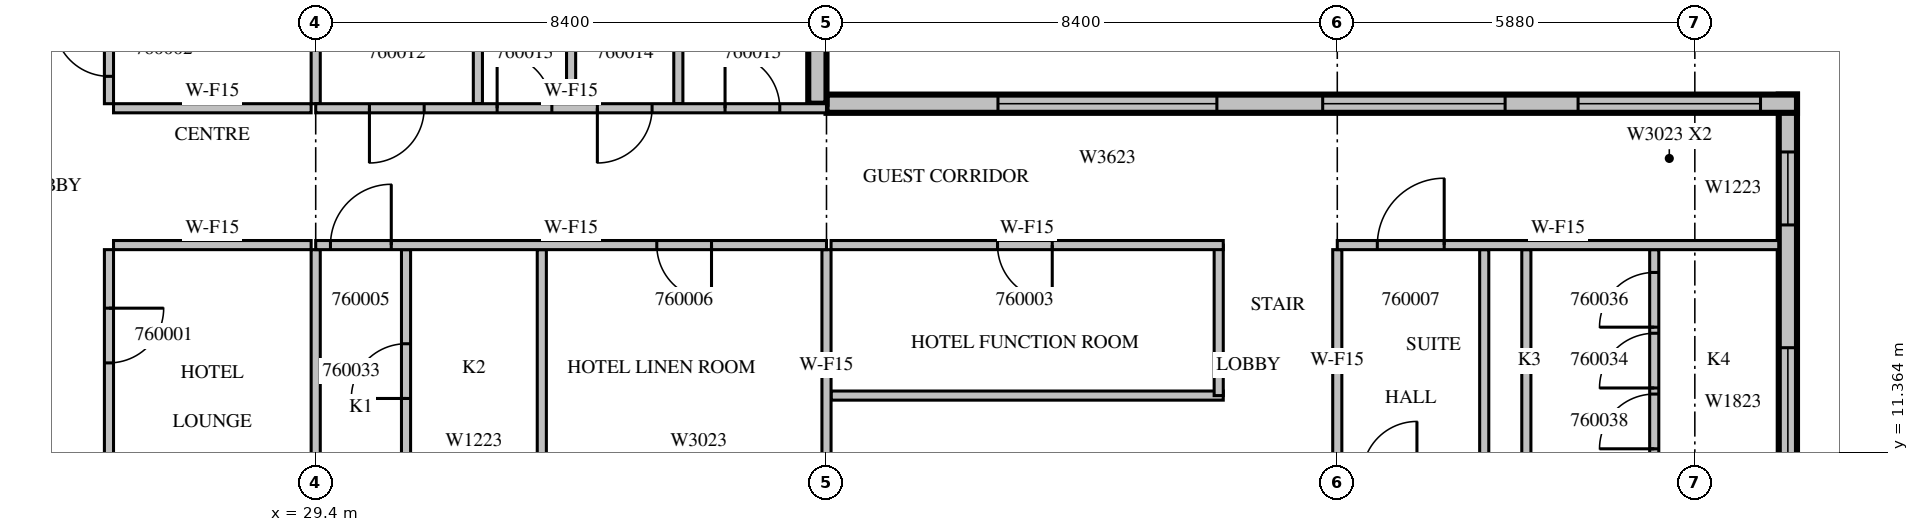
"""IFC4 building model, lengths in metres.
Left out: names, types, materials, properties, quantities, classifications, styles, units other than length and angle.
Written with IfcOpenShell. Run it as: python <this file> out.ifc"""

import sys

from ifc_helpers import new_model, si_unit, direction, frame, frame_2d, origin, place, context, subcontext, project, spatial, rectangle, extrude, source, transform, mapped, element, fill, save


model = new_model("IFC4")
c1 = context("Model", 3, precision=1e-05, world=origin(), true_north=direction((0.0, 1.0)))
c2 = subcontext(c1, "Body", "Model", "MODEL_VIEW")
j1 = project(units=[si_unit("LENGTHUNIT", "METRE"), si_unit("PLANEANGLEUNIT", "RADIAN")], contexts=[c1])
p1 = place(None, origin())
s1 = spatial("IfcSite", under=j1, at=p1, CompositionType="ELEMENT")
p2 = place(p1, origin())
s2 = spatial("IfcBuilding", under=s1, at=p2, CompositionType="ELEMENT")
p3 = place(p2, frame((0.0, 0.0, 261.4)))
s3 = spatial("IfcBuildingStorey", under=s2, at=p3, CompositionType="ELEMENT", Elevation=261.4)
m1 = source(origin(), c2, "Body", "SweptSolid", [
    extrude(rectangle(XDim=6.75, YDim=0.3, at=frame_2d((3.375, 0.0))), origin(), (0.0, 0.0, 1.0), 3.4),
])
p4 = place(p3, frame((53.61, 10.5, 0.0), z_axis=(0.0, 0.0, 1.0), x_axis=(0.0, 1.0, 0.0)))
e1 = element("IfcWall", 1, at=p4, inside=s3, PredefinedType="STANDARD", context=c2, shape_type="MappedRepresentation", body=[
    mapped(m1, transform((0.0, 0.0, 0.0), scale=1.0)),
])
m2 = source(origin(), c2, "Body", "SweptSolid", [
    extrude(rectangle(XDim=1.8, YDim=2.3, at=frame_2d((0.9, 1.15))), frame((0.0, 0.16, 0.0), z_axis=(0.0, -1.0, 0.0), x_axis=(1.0, 0.0, 0.0)), (0.0, 0.0, 1.0), 0.32),
])
p5 = place(p4, frame((0.787, 0.0, 0.6)))
e2 = element("IfcOpeningElement", 2, at=p5, cuts=e1, PredefinedType="OPENING", context=c2, shape_type="MappedRepresentation", body=[
    mapped(m2, transform((0.0, 0.0, 0.0), scale=1.0)),
])
m3 = source(origin(), c2, "Body", "SweptSolid", [
    extrude(rectangle(XDim=1.2, YDim=2.3, at=frame_2d((0.6, 1.15))), frame((0.0, 0.16, 0.0), z_axis=(0.0, -1.0, 0.0), x_axis=(1.0, 0.0, 0.0)), (0.0, 0.0, 1.0), 0.32),
])
p6 = place(p4, frame((4.606, 0.0, 0.6)))
e3 = element("IfcOpeningElement", 3, at=p6, cuts=e1, PredefinedType="OPENING", context=c2, shape_type="MappedRepresentation", body=[
    mapped(m3, transform((0.0, 0.0, 0.0), scale=1.0)),
])
m4 = source(origin(), c2, "Body", "SweptSolid", [
    extrude(rectangle(XDim=15.96, YDim=0.3, at=frame_2d((7.98, 0.0))), origin(), (0.0, 0.0, 1.0), 3.4),
])
p7 = place(p3, frame((53.76, 17.1, 0.0), z_axis=(0.0, 0.0, 1.0), x_axis=(-1.0, 0.0, 0.0)))
e4 = element("IfcWall", 4, at=p7, inside=s3, PredefinedType="STANDARD", context=c2, shape_type="MappedRepresentation", body=[
    mapped(m4, transform((0.0, 0.0, 0.0), scale=1.0)),
])
m5 = source(origin(), c2, "Body", "SweptSolid", [
    extrude(rectangle(XDim=3.0, YDim=2.3, at=frame_2d((1.5, 1.15))), frame((0.0, 0.16, 0.0), z_axis=(0.0, -1.0, 0.0), x_axis=(1.0, 0.0, 0.0)), (0.0, 0.0, 1.0), 0.32),
])
p8 = place(p7, frame((0.6, 0.0, 0.6)))
e5 = element("IfcOpeningElement", 5, at=p8, cuts=e4, PredefinedType="OPENING", context=c2, shape_type="MappedRepresentation", body=[
    mapped(m5, transform((0.0, 0.0, 0.0), scale=1.0)),
])
p9 = place(p7, frame((4.8, 0.0, 0.6)))
e6 = element("IfcOpeningElement", 6, at=p9, cuts=e4, PredefinedType="OPENING", context=c2, shape_type="MappedRepresentation", body=[
    mapped(m5, transform((0.0, 0.0, 0.0), scale=1.0)),
])
m6 = source(origin(), c2, "Body", "SweptSolid", [
    extrude(rectangle(XDim=3.6, YDim=2.3, at=frame_2d((1.8, 1.15))), frame((0.0, 0.16, 0.0), z_axis=(0.0, -1.0, 0.0), x_axis=(1.0, 0.0, 0.0)), (0.0, 0.0, 1.0), 0.32),
])
p10 = place(p7, frame((9.54, 0.0, 0.6)))
e7 = element("IfcOpeningElement", 7, at=p10, cuts=e4, PredefinedType="OPENING", context=c2, shape_type="MappedRepresentation", body=[
    mapped(m6, transform((0.0, 0.0, 0.0), scale=1.0)),
])
m7 = source(origin(), c2, "Body", "SweptSolid", [
    extrude(rectangle(XDim=3.1, YDim=0.3, at=frame_2d((1.55, 0.0))), origin(), (0.0, 0.0, 1.0), 3.4),
])
p11 = place(p3, frame((37.65, 17.1, 0.0), z_axis=(0.0, 0.0, 1.0), x_axis=(0.0, 1.0, 0.0)))
e8 = element("IfcWall", 8, at=p11, inside=s3, PredefinedType="STANDARD", context=c2, shape_type="MappedRepresentation", body=[
    mapped(m7, transform((0.0, 0.0, 0.0), scale=1.0)),
])
p12 = place(p11, frame((1.125, 0.0, 0.6)))
e9 = element("IfcOpeningElement", 9, at=p12, cuts=e8, PredefinedType="OPENING", context=c2, shape_type="MappedRepresentation", body=[
    mapped(m2, transform((0.0, 0.0, 0.0), scale=1.0)),
])
m8 = source(origin(), c2, "Body", "SweptSolid", [
    extrude(rectangle(XDim=3.995, YDim=0.15, at=frame_2d((1.998, 0.0))), origin(), (0.0, 0.0, 1.0), 3.4),
])
p13 = place(p3, frame((26.0, 14.7, 0.0), z_axis=(0.0, 0.0, 1.0), x_axis=(0.0, -1.0, 0.0)))
e10 = element("IfcWall", 10, at=p13, inside=s3, PredefinedType="PARTITIONING", context=c2, shape_type="MappedRepresentation", body=[
    mapped(m8, transform((0.0, 0.0, 0.0), scale=1.0)),
])
m9 = source(origin(), c2, "Body", "SweptSolid", [
    extrude(rectangle(XDim=0.9, YDim=2.1, at=frame_2d((0.45, 1.05))), frame((0.0, 0.085, 0.0), z_axis=(0.0, -1.0, 0.0), x_axis=(1.0, 0.0, 0.0)), (0.0, 0.0, 1.0), 0.17),
])
p14 = place(p13, frame((0.963, 0.0, 0.0)))
e11 = element("IfcOpeningElement", 11, at=p14, cuts=e10, PredefinedType="OPENING", context=c2, shape_type="MappedRepresentation", body=[
    mapped(m9, transform((0.0, 0.0, 0.0), scale=1.0)),
])
m10 = source(origin(), c2, "Body", "SweptSolid", [
    extrude(rectangle(XDim=3.6, YDim=0.15, at=frame_2d((1.8, 0.0))), origin(), (0.0, 0.0, 1.0), 3.4),
])
p15 = place(p3, frame((26.0, 20.7, 0.0), z_axis=(0.0, 0.0, 1.0), x_axis=(0.0, -1.0, 0.0)))
e12 = element("IfcWall", 12, at=p15, inside=s3, PredefinedType="PARTITIONING", context=c2, shape_type="MappedRepresentation", body=[
    mapped(m10, transform((0.0, 0.0, 0.0), scale=1.0)),
])
p16 = place(p15, frame((2.25, 0.0, 0.0)))
e13 = element("IfcOpeningElement", 13, at=p16, cuts=e12, PredefinedType="OPENING", context=c2, shape_type="MappedRepresentation", body=[
    mapped(m9, transform((0.0, 0.0, 0.0), scale=1.0)),
])
m11 = source(origin(), c2, "Body", "SweptSolid", [
    extrude(rectangle(XDim=3.25, YDim=0.15, at=frame_2d((1.625, 0.0))), origin(), (0.0, 0.0, 1.0), 3.4),
])
for number, where, z_axis, x_axis in (
    (14, (29.325, 14.775, 0.0), (0.0, 0.0, 1.0), (-1.0, 0.0, 0.0)),
    (15, (26.075, 17.025, 0.0), (0.0, 0.0, 1.0), (1.0, 0.0, 0.0)),
):
    element("IfcWall", number, at=place(p3, frame(where, z_axis=z_axis, x_axis=x_axis)), inside=s3, PredefinedType="PARTITIONING", context=c2, shape_type="MappedRepresentation", body=[
        mapped(m11, transform((0.0, 0.0, 0.0), scale=1.0)),
    ])
m12 = source(origin(), c2, "Body", "SweptSolid", [
    extrude(rectangle(XDim=3.801, YDim=0.15, at=frame_2d((1.901, 0.0))), origin(), (0.0, 0.0, 1.0), 3.4),
])
p17 = place(p3, frame((29.4, 10.899, 0.0), z_axis=(0.0, 0.0, 1.0), x_axis=(0.0, 1.0, 0.0)))
e16 = element("IfcWall", 16, at=p17, inside=s3, PredefinedType="PARTITIONING", context=c2, shape_type="MappedRepresentation", body=[
    mapped(m12, transform((0.0, 0.0, 0.0), scale=1.0)),
])
m13 = source(origin(), c2, "Body", "SweptSolid", [
    extrude(rectangle(XDim=3.101, YDim=0.15, at=frame_2d((1.55, 0.0))), origin(), (0.0, 0.0, 1.0), 3.4),
])
p18 = place(p3, frame((29.4, 17.1, 0.0), z_axis=(0.0, 0.0, 1.0), x_axis=(0.0, 1.0, 0.0)))
e17 = element("IfcWall", 17, at=p18, inside=s3, PredefinedType="PARTITIONING", context=c2, shape_type="MappedRepresentation", body=[
    mapped(m13, transform((0.0, 0.0, 0.0), scale=1.0)),
])
m14 = source(origin(), c2, "Body", "SweptSolid", [
    extrude(rectangle(XDim=6.45, YDim=0.15, at=frame_2d((3.225, 0.0))), origin(), (0.0, 0.0, 1.0), 3.4),
])
p19 = place(p3, frame((37.875, 12.3, 0.0), z_axis=(0.0, 0.0, 1.0), x_axis=(1.0, 0.0, 0.0)))
e18 = element("IfcWall", 18, at=p19, inside=s3, PredefinedType="PARTITIONING", context=c2, shape_type="MappedRepresentation", body=[
    mapped(m14, transform((0.0, 0.0, 0.0), scale=1.0)),
])
m15 = source(origin(), c2, "Body", "SweptSolid", [
    extrude(rectangle(XDim=2.475, YDim=0.15, at=frame_2d((1.238, 0.0))), origin(), (0.0, 0.0, 1.0), 3.4),
])
p20 = place(p3, frame((44.25, 12.3, 0.0), z_axis=(0.0, 0.0, 1.0), x_axis=(0.0, 1.0, 0.0)))
e19 = element("IfcWall", 19, at=p20, inside=s3, PredefinedType="PARTITIONING", context=c2, shape_type="MappedRepresentation", body=[
    mapped(m15, transform((0.0, 0.0, 0.0), scale=1.0)),
])
p21 = place(p3, frame((44.325, 14.775, 0.0), z_axis=(0.0, 0.0, 1.0), x_axis=(-1.0, 0.0, 0.0)))
e20 = element("IfcWall", 20, at=p21, inside=s3, PredefinedType="PARTITIONING", context=c2, shape_type="MappedRepresentation", body=[
    mapped(m14, transform((0.0, 0.0, 0.0), scale=1.0)),
])
p22 = place(p21, frame((2.812, 0.0, 0.0)))
e21 = element("IfcOpeningElement", 21, at=p22, cuts=e20, PredefinedType="OPENING", context=c2, shape_type="MappedRepresentation", body=[
    mapped(m9, transform((0.0, 0.0, 0.0), scale=1.0)),
])
p23 = place(p3, frame((30.885, 10.705, 0.0), z_axis=(0.0, 0.0, 1.0), x_axis=(0.0, 1.0, 0.0)))
e22 = element("IfcWall", 22, at=p23, inside=s3, PredefinedType="PARTITIONING", context=c2, shape_type="MappedRepresentation", body=[
    mapped(m8, transform((0.0, 0.0, 0.0), scale=1.0)),
])
p24 = place(p23, frame((1.548, 0.0, 0.0)))
e23 = element("IfcOpeningElement", 23, at=p24, cuts=e22, PredefinedType="OPENING", context=c2, shape_type="MappedRepresentation", body=[
    mapped(m9, transform((0.0, 0.0, 0.0), scale=1.0)),
])
p25 = place(p3, frame((33.118, 10.705, 0.0), z_axis=(0.0, 0.0, 1.0), x_axis=(0.0, 1.0, 0.0)))
e24 = element("IfcWall", 24, at=p25, inside=s3, PredefinedType="PARTITIONING", context=c2, shape_type="MappedRepresentation", body=[
    mapped(m8, transform((0.0, 0.0, 0.0), scale=1.0)),
])
p26 = place(p3, frame((37.8, 10.899, 0.0), z_axis=(0.0, 0.0, 1.0), x_axis=(0.0, 1.0, 0.0)))
e25 = element("IfcWall", 25, at=p26, inside=s3, PredefinedType="PARTITIONING", context=c2, shape_type="MappedRepresentation", body=[
    mapped(m12, transform((0.0, 0.0, 0.0), scale=1.0)),
])
m16 = source(origin(), c2, "Body", "SweptSolid", [
    extrude(rectangle(XDim=3.65, YDim=0.15, at=frame_2d((1.825, 0.0))), origin(), (0.0, 0.0, 1.0), 3.4),
])
for number, where, z_axis, x_axis in (
    (26, (48.617, 11.05, 0.0), (0.0, 0.0, 1.0), (0.0, 1.0, 0.0)),
    (27, (49.309, 11.05, 0.0), (0.0, 0.0, 1.0), (0.0, 1.0, 0.0)),
):
    element("IfcWall", number, at=place(p3, frame(where, z_axis=z_axis, x_axis=x_axis)), inside=s3, PredefinedType="PARTITIONING", context=c2, shape_type="MappedRepresentation", body=[
        mapped(m16, transform((0.0, 0.0, 0.0), scale=1.0)),
    ])
p27 = place(p3, frame((51.412, 11.05, 0.0), z_axis=(0.0, 0.0, 1.0), x_axis=(0.0, 1.0, 0.0)))
e28 = element("IfcWall", 28, at=p27, inside=s3, PredefinedType="PARTITIONING", context=c2, shape_type="MappedRepresentation", body=[
    mapped(m16, transform((0.0, 0.0, 0.0), scale=1.0)),
])
p28 = place(p27, frame((1.375, 0.0, 0.0)))
e29 = element("IfcOpeningElement", 29, at=p28, cuts=e28, PredefinedType="OPENING", context=c2, shape_type="MappedRepresentation", body=[
    mapped(m9, transform((0.0, 0.0, 0.0), scale=1.0)),
])
p29 = place(p27, frame((2.375, 0.0, 0.0)))
e30 = element("IfcOpeningElement", 30, at=p29, cuts=e28, PredefinedType="OPENING", context=c2, shape_type="MappedRepresentation", body=[
    mapped(m9, transform((0.0, 0.0, 0.0), scale=1.0)),
])
p30 = place(p27, frame((0.375, 0.0, 0.0)))
e31 = element("IfcOpeningElement", 31, at=p30, cuts=e28, PredefinedType="OPENING", context=c2, shape_type="MappedRepresentation", body=[
    mapped(m9, transform((0.0, 0.0, 0.0), scale=1.0)),
])
p31 = place(p3, frame((46.2, 11.05, 0.0), z_axis=(0.0, 0.0, 1.0), x_axis=(0.0, 1.0, 0.0)))
e32 = element("IfcWall", 32, at=p31, inside=s3, PredefinedType="PARTITIONING", context=c2, shape_type="MappedRepresentation", body=[
    mapped(m16, transform((0.0, 0.0, 0.0), scale=1.0)),
])
for number, where, z_axis, x_axis in (
    (33, (32.067, 20.7, 0.0), (0.0, 0.0, 1.0), (0.0, -1.0, 0.0)),
    (34, (35.363, 20.7, 0.0), (0.0, 0.0, 1.0), (0.0, -1.0, 0.0)),
    (35, (33.6, 17.1, 0.0), (0.0, 0.0, 1.0), (0.0, 1.0, 0.0)),
):
    element("IfcWall", number, at=place(p3, frame(where, z_axis=z_axis, x_axis=x_axis)), inside=s3, PredefinedType="PARTITIONING", context=c2, shape_type="MappedRepresentation", body=[
        mapped(m10, transform((0.0, 0.0, 0.0), scale=1.0)),
    ])
m17 = source(origin(), c2, "Body", "SweptSolid", [
    extrude(rectangle(XDim=8.4, YDim=0.15, at=frame_2d((4.2, 0.0))), origin(), (0.0, 0.0, 1.0), 3.4),
])
p32 = place(p3, frame((37.8, 14.775, 0.0), z_axis=(0.0, 0.0, 1.0), x_axis=(-1.0, 0.0, 0.0)))
e36 = element("IfcWall", 36, at=p32, inside=s3, PredefinedType="PARTITIONING", context=c2, shape_type="MappedRepresentation", body=[
    mapped(m17, transform((0.0, 0.0, 0.0), scale=1.0)),
])
m18 = source(origin(), c2, "Body", "SweptSolid", [
    extrude(rectangle(XDim=1.0, YDim=2.1, at=frame_2d((0.5, 1.05))), frame((0.0, 0.085, 0.0), z_axis=(0.0, -1.0, 0.0), x_axis=(1.0, 0.0, 0.0)), (0.0, 0.0, 1.0), 0.17),
])
p33 = place(p32, frame((7.157, 0.0, 0.0)))
e37 = element("IfcOpeningElement", 37, at=p33, cuts=e36, PredefinedType="OPENING", context=c2, shape_type="MappedRepresentation", body=[
    mapped(m18, transform((0.0, 0.0, 0.0), scale=1.0)),
])
p34 = place(p32, frame((1.891, 0.0, 0.0)))
e38 = element("IfcOpeningElement", 38, at=p34, cuts=e36, PredefinedType="OPENING", context=c2, shape_type="MappedRepresentation", body=[
    mapped(m9, transform((0.0, 0.0, 0.0), scale=1.0)),
])
m19 = source(origin(), c2, "Body", "SweptSolid", [
    extrude(rectangle(XDim=7.26, YDim=0.15, at=frame_2d((3.63, 0.0))), origin(), (0.0, 0.0, 1.0), 3.4),
])
p35 = place(p3, frame((53.46, 14.775, 0.0), z_axis=(0.0, 0.0, 1.0), x_axis=(-1.0, 0.0, 0.0)))
e39 = element("IfcWall", 39, at=p35, inside=s3, PredefinedType="PARTITIONING", context=c2, shape_type="MappedRepresentation", body=[
    mapped(m19, transform((0.0, 0.0, 0.0), scale=1.0)),
])
m20 = source(origin(), c2, "Body", "SweptSolid", [
    extrude(rectangle(XDim=1.1, YDim=2.1, at=frame_2d((0.55, 1.05))), frame((0.0, 0.085, 0.0), z_axis=(0.0, -1.0, 0.0), x_axis=(1.0, 0.0, 0.0)), (0.0, 0.0, 1.0), 0.17),
])
p36 = place(p35, frame((5.502, 0.0, 0.0)))
e40 = element("IfcOpeningElement", 40, at=p36, cuts=e39, PredefinedType="OPENING", context=c2, shape_type="MappedRepresentation", body=[
    mapped(m20, transform((0.0, 0.0, 0.0), scale=1.0)),
])
p37 = place(p3, frame((29.4, 17.025, 0.0), z_axis=(0.0, 0.0, 1.0), x_axis=(1.0, 0.0, 0.0)))
e41 = element("IfcWall", 41, at=p37, inside=s3, PredefinedType="PARTITIONING", context=c2, shape_type="MappedRepresentation", body=[
    mapped(m17, transform((0.0, 0.0, 0.0), scale=1.0)),
])
p38 = place(p37, frame((0.883, 0.0, 0.0)))
e42 = element("IfcOpeningElement", 42, at=p38, cuts=e41, PredefinedType="OPENING", context=c2, shape_type="MappedRepresentation", body=[
    mapped(m9, transform((0.0, 0.0, 0.0), scale=1.0)),
])
p39 = place(p37, frame((2.983, 0.0, 0.0)))
e43 = element("IfcOpeningElement", 43, at=p39, cuts=e41, PredefinedType="OPENING", context=c2, shape_type="MappedRepresentation", body=[
    mapped(m9, transform((0.0, 0.0, 0.0), scale=1.0)),
])
p40 = place(p37, frame((4.632, 0.0, 0.0)))
e44 = element("IfcOpeningElement", 44, at=p40, cuts=e41, PredefinedType="OPENING", context=c2, shape_type="MappedRepresentation", body=[
    mapped(m9, transform((0.0, 0.0, 0.0), scale=1.0)),
])
p41 = place(p37, frame((6.732, 0.0, 0.0)))
e45 = element("IfcOpeningElement", 45, at=p41, cuts=e41, PredefinedType="OPENING", context=c2, shape_type="MappedRepresentation", body=[
    mapped(m9, transform((0.0, 0.0, 0.0), scale=1.0)),
])
m21 = source(origin(), c2, "Body", "SweptSolid", [
    extrude(rectangle(XDim=1.8, YDim=2.3, at=frame_2d((0.9, 1.15))), frame((0.0, 0.03, 0.0), z_axis=(0.0, -1.0, 0.0), x_axis=(1.0, 0.0, 0.0)), (0.0, 0.0, 1.0), 0.06),
])
p42 = place(p5, origin())
e46 = element("IfcWindow", 46, at=p42, inside=s3, PartitioningType="SINGLE_PANEL", PredefinedType="WINDOW", context=c2, shape_type="MappedRepresentation", body=[
    mapped(m21, transform((0.0, 0.0, 0.0), scale=1.0)),
])
fill(e2, e46)
m22 = source(origin(), c2, "Body", "SweptSolid", [
    extrude(rectangle(XDim=1.2, YDim=2.3, at=frame_2d((0.6, 1.15))), frame((0.0, 0.03, 0.0), z_axis=(0.0, -1.0, 0.0), x_axis=(1.0, 0.0, 0.0)), (0.0, 0.0, 1.0), 0.06),
])
p43 = place(p6, origin())
e47 = element("IfcWindow", 47, at=p43, inside=s3, PartitioningType="SINGLE_PANEL", PredefinedType="WINDOW", context=c2, shape_type="MappedRepresentation", body=[
    mapped(m22, transform((0.0, 0.0, 0.0), scale=1.0)),
])
fill(e3, e47)
m23 = source(origin(), c2, "Body", "SweptSolid", [
    extrude(rectangle(XDim=3.0, YDim=2.3, at=frame_2d((1.5, 1.15))), frame((0.0, 0.03, 0.0), z_axis=(0.0, -1.0, 0.0), x_axis=(1.0, 0.0, 0.0)), (0.0, 0.0, 1.0), 0.06),
])
p44 = place(p8, origin())
e48 = element("IfcWindow", 48, at=p44, inside=s3, PartitioningType="SINGLE_PANEL", PredefinedType="WINDOW", context=c2, shape_type="MappedRepresentation", body=[
    mapped(m23, transform((0.0, 0.0, 0.0), scale=1.0)),
])
fill(e5, e48)
p45 = place(p9, origin())
e49 = element("IfcWindow", 49, at=p45, inside=s3, PartitioningType="SINGLE_PANEL", PredefinedType="WINDOW", context=c2, shape_type="MappedRepresentation", body=[
    mapped(m23, transform((0.0, 0.0, 0.0), scale=1.0)),
])
fill(e6, e49)
m24 = source(origin(), c2, "Body", "SweptSolid", [
    extrude(rectangle(XDim=3.6, YDim=2.3, at=frame_2d((1.8, 1.15))), frame((0.0, 0.03, 0.0), z_axis=(0.0, -1.0, 0.0), x_axis=(1.0, 0.0, 0.0)), (0.0, 0.0, 1.0), 0.06),
])
p46 = place(p10, origin())
e50 = element("IfcWindow", 50, at=p46, inside=s3, PartitioningType="SINGLE_PANEL", PredefinedType="WINDOW", context=c2, shape_type="MappedRepresentation", body=[
    mapped(m24, transform((0.0, 0.0, 0.0), scale=1.0)),
])
fill(e7, e50)
m25 = source(origin(), c2, "Body", "SweptSolid", [
    extrude(rectangle(XDim=0.9, YDim=2.1, at=frame_2d((0.45, 1.05))), frame((0.0, 0.025, 0.0), z_axis=(0.0, -1.0, 0.0), x_axis=(1.0, 0.0, 0.0)), (0.0, 0.0, 1.0), 0.05),
])
p47 = place(p14, origin())
e51 = element("IfcDoor", 51, at=p47, inside=s3, OperationType="SINGLE_SWING_LEFT", PredefinedType="DOOR", context=c2, shape_type="MappedRepresentation", body=[
    mapped(m25, transform((0.0, 0.0, 0.0), scale=1.0)),
])
fill(e11, e51)
p48 = place(p16, origin())
e52 = element("IfcDoor", 52, at=p48, inside=s3, OperationType="SINGLE_SWING_RIGHT", PredefinedType="DOOR", context=c2, shape_type="MappedRepresentation", body=[
    mapped(m25, transform((0.0, 0.0, 0.0), scale=1.0)),
])
fill(e13, e52)
p49 = place(p22, origin())
e53 = element("IfcDoor", 53, at=p49, inside=s3, OperationType="SINGLE_SWING_LEFT", PredefinedType="DOOR", context=c2, shape_type="MappedRepresentation", body=[
    mapped(m25, transform((0.0, 0.0, 0.0), scale=1.0)),
])
fill(e21, e53)
m26 = source(origin(), c2, "Body", "SweptSolid", [
    extrude(rectangle(XDim=1.0, YDim=2.1, at=frame_2d((0.5, 1.05))), frame((0.0, 0.025, 0.0), z_axis=(0.0, -1.0, 0.0), x_axis=(1.0, 0.0, 0.0)), (0.0, 0.0, 1.0), 0.05),
])
p50 = place(p33, origin())
e54 = element("IfcDoor", 54, at=p50, inside=s3, OperationType="SINGLE_SWING_RIGHT", PredefinedType="DOOR", context=c2, shape_type="MappedRepresentation", body=[
    mapped(m26, transform((0.0, 0.0, 0.0), scale=1.0)),
])
fill(e37, e54)
p51 = place(p34, origin())
e55 = element("IfcDoor", 55, at=p51, inside=s3, OperationType="SINGLE_SWING_LEFT", PredefinedType="DOOR", context=c2, shape_type="MappedRepresentation", body=[
    mapped(m25, transform((0.0, 0.0, 0.0), scale=1.0)),
])
fill(e38, e55)
m27 = source(origin(), c2, "Body", "SweptSolid", [
    extrude(rectangle(XDim=1.1, YDim=2.1, at=frame_2d((0.55, 1.05))), frame((0.0, 0.025, 0.0), z_axis=(0.0, -1.0, 0.0), x_axis=(1.0, 0.0, 0.0)), (0.0, 0.0, 1.0), 0.05),
])
p52 = place(p36, origin())
e56 = element("IfcDoor", 56, at=p52, inside=s3, OperationType="SINGLE_SWING_RIGHT", PredefinedType="DOOR", context=c2, shape_type="MappedRepresentation", body=[
    mapped(m27, transform((0.0, 0.0, 0.0), scale=1.0)),
])
fill(e40, e56)
p53 = place(p38, origin())
e57 = element("IfcDoor", 57, at=p53, inside=s3, OperationType="SINGLE_SWING_RIGHT", PredefinedType="DOOR", context=c2, shape_type="MappedRepresentation", body=[
    mapped(m25, transform((0.0, 0.0, 0.0), scale=1.0)),
])
fill(e42, e57)
p54 = place(p39, origin())
e58 = element("IfcDoor", 58, at=p54, inside=s3, OperationType="SINGLE_SWING_LEFT", PredefinedType="DOOR", context=c2, shape_type="MappedRepresentation", body=[
    mapped(m25, transform((0.0, 0.0, 0.0), scale=1.0)),
])
fill(e43, e58)
p55 = place(p40, origin())
e59 = element("IfcDoor", 59, at=p55, inside=s3, OperationType="SINGLE_SWING_RIGHT", PredefinedType="DOOR", context=c2, shape_type="MappedRepresentation", body=[
    mapped(m25, transform((0.0, 0.0, 0.0), scale=1.0)),
])
fill(e44, e59)
p56 = place(p41, origin())
e60 = element("IfcDoor", 60, at=p56, inside=s3, OperationType="SINGLE_SWING_LEFT", PredefinedType="DOOR", context=c2, shape_type="MappedRepresentation", body=[
    mapped(m25, transform((0.0, 0.0, 0.0), scale=1.0)),
])
fill(e45, e60)
p57 = place(p24, origin())
e61 = element("IfcDoor", 61, at=p57, inside=s3, OperationType="SINGLE_SWING_LEFT", PredefinedType="DOOR", context=c2, shape_type="MappedRepresentation", body=[
    mapped(m25, transform((0.0, 0.0, 0.0), scale=1.0)),
])
fill(e23, e61)
p58 = place(p28, origin())
e62 = element("IfcDoor", 62, at=p58, inside=s3, OperationType="SINGLE_SWING_LEFT", PredefinedType="DOOR", context=c2, shape_type="MappedRepresentation", body=[
    mapped(m25, transform((0.0, 0.0, 0.0), scale=1.0)),
])
fill(e29, e62)
p59 = place(p29, origin())
e63 = element("IfcDoor", 63, at=p59, inside=s3, OperationType="SINGLE_SWING_LEFT", PredefinedType="DOOR", context=c2, shape_type="MappedRepresentation", body=[
    mapped(m25, transform((0.0, 0.0, 0.0), scale=1.0)),
])
fill(e30, e63)
p60 = place(p30, origin())
e64 = element("IfcDoor", 64, at=p60, inside=s3, OperationType="SINGLE_SWING_LEFT", PredefinedType="DOOR", context=c2, shape_type="MappedRepresentation", body=[
    mapped(m25, transform((0.0, 0.0, 0.0), scale=1.0)),
])
fill(e31, e64)
save(model, sys.argv[1])
